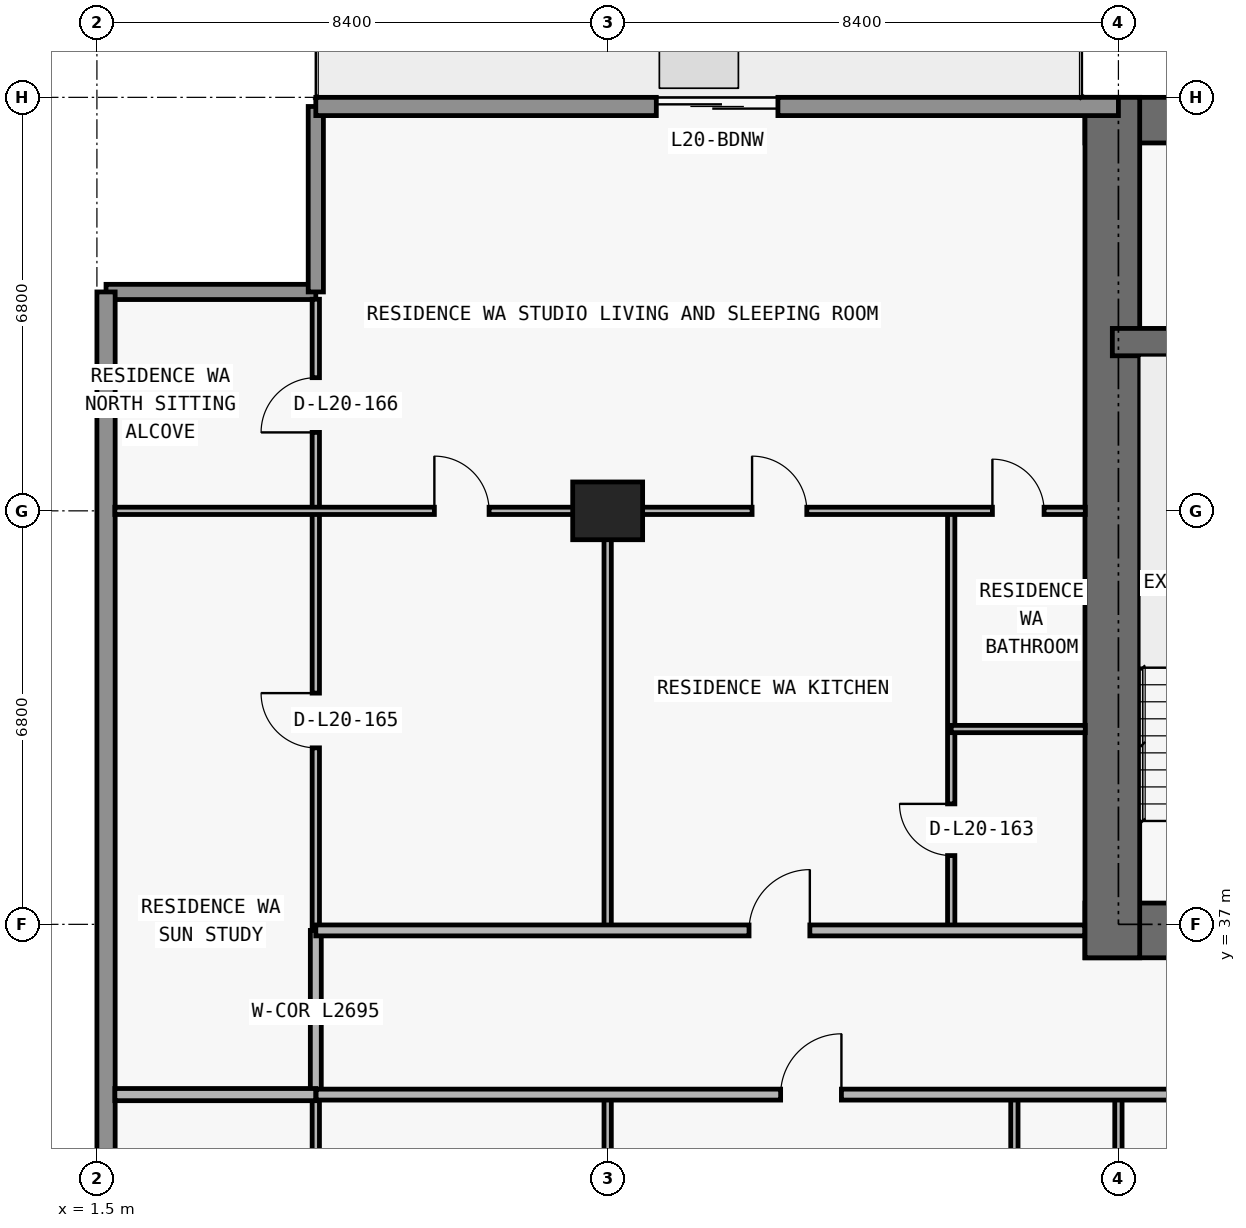
"""IFC4 building model, lengths in metres.
Left out: names, types, materials, properties, quantities, classifications, styles, units other than length and angle.
Written with IfcOpenShell. Run it as: python <this file> out.ifc"""

import sys

from ifc_helpers import new_model, si_unit, direction, frame, frame_2d, origin, origin_2d, place, context, subcontext, project, spatial, rectangle, extrude, element, fill, save


model = new_model("IFC4")
c1 = context("Model", 3, precision=1e-05, world=origin(), true_north=direction((0.0, 1.0)))
c2 = subcontext(c1, "Body", "Model", "MODEL_VIEW")
j1 = project(units=[si_unit("LENGTHUNIT", "METRE"), si_unit("PLANEANGLEUNIT", "RADIAN")], contexts=[c1])
p1 = place(None, origin())
s1 = spatial("IfcSite", under=j1, at=p1, CompositionType="ELEMENT")
p2 = place(p1, origin())
s2 = spatial("IfcBuilding", under=s1, at=p2, CompositionType="ELEMENT")
p3 = place(p2, frame((0.0, 0.0, 76.2)))
s3 = spatial("IfcBuildingStorey", under=s2, at=p3, CompositionType="ELEMENT", Elevation=76.2)
p4 = place(p3, frame((9.9, 43.8, 0.0), z_axis=(0.0, 0.0, 1.0), x_axis=(1.0, 0.0, 0.0)))
e1 = element("IfcColumn", 1, at=p4, inside=s3, PredefinedType="COLUMN", context=c2, shape_type="SweptSolid", body=[
    extrude(rectangle(XDim=1.15, YDim=0.95, at=origin_2d()), origin(), (0.0, 0.0, 1.0), 3.0),
])
p5 = place(p3, frame((17.75, 36.9, 0.0), z_axis=(0.0, 0.0, 1.0), x_axis=(1.0, 0.0, 0.0)))
e2 = element("IfcWall", 2, at=p5, inside=s3, PredefinedType="SHEAR", context=c2, shape_type="SweptSolid", body=[
    extrude(rectangle(XDim=42.3, YDim=0.9, at=frame_2d((21.15, 0.0))), origin(), (0.0, 0.0, 1.0), 3.0),
])
p6 = place(p5, frame((14.55, 0.0, 0.0)))
e3 = element("IfcOpeningElement", 3, at=p6, cuts=e2, PredefinedType="OPENING", context=c2, shape_type="SweptSolid", body=[
    extrude(rectangle(XDim=1.1, YDim=2.15, at=frame_2d((0.55, 1.075))), frame((0.0, 0.46, 0.0), z_axis=(0.0, -1.0, 0.0), x_axis=(1.0, 0.0, 0.0)), (0.0, 0.0, 1.0), 0.92),
])
p7 = place(p5, frame((6.4, 0.0, 0.0)))
e4 = element("IfcOpeningElement", 4, at=p7, cuts=e2, PredefinedType="OPENING", context=c2, shape_type="SweptSolid", body=[
    extrude(rectangle(XDim=1.05, YDim=2.15, at=frame_2d((0.525, 1.075))), frame((0.0, 0.46, 0.0), z_axis=(0.0, -1.0, 0.0), x_axis=(1.0, 0.0, 0.0)), (0.0, 0.0, 1.0), 0.92),
])
p8 = place(p5, frame((34.9, 0.0, 0.0)))
e5 = element("IfcOpeningElement", 5, at=p8, cuts=e2, PredefinedType="OPENING", context=c2, shape_type="SweptSolid", body=[
    extrude(rectangle(XDim=1.05, YDim=2.15, at=frame_2d((0.525, 1.075))), frame((0.0, 0.46, 0.0), z_axis=(0.0, -1.0, 0.0), x_axis=(1.0, 0.0, 0.0)), (0.0, 0.0, 1.0), 0.92),
])
p9 = place(p5, frame((11.012, 0.0, 0.0)))
e6 = element("IfcOpeningElement", 6, at=p9, cuts=e2, PredefinedType="OPENING", context=c2, shape_type="SweptSolid", body=[
    extrude(rectangle(XDim=1.05, YDim=2.15, at=frame_2d((0.525, 1.075))), frame((0.0, 0.46, 0.0), z_axis=(0.0, -1.0, 0.0), x_axis=(1.0, 0.0, 0.0)), (0.0, 0.0, 1.0), 0.92),
])
p10 = place(p5, frame((24.25, 0.0, 0.0)))
e7 = element("IfcOpeningElement", 7, at=p10, cuts=e2, PredefinedType="OPENING", context=c2, shape_type="SweptSolid", body=[
    extrude(rectangle(XDim=1.05, YDim=2.15, at=frame_2d((0.525, 1.075))), frame((0.0, 0.46, 0.0), z_axis=(0.0, -1.0, 0.0), x_axis=(1.0, 0.0, 0.0)), (0.0, 0.0, 1.0), 0.92),
])
p11 = place(p3, frame((17.75, 50.225, 0.0), z_axis=(0.0, 0.0, 1.0), x_axis=(1.0, 0.0, 0.0)))
e8 = element("IfcWall", 8, at=p11, inside=s3, PredefinedType="SHEAR", context=c2, shape_type="SweptSolid", body=[
    extrude(rectangle(XDim=42.3, YDim=0.75, at=frame_2d((21.15, 0.0))), origin(), (0.0, 0.0, 1.0), 3.0),
])
p12 = place(p3, frame((18.2, 36.45, 0.0), z_axis=(0.0, 0.0, 1.0), x_axis=(0.0, 1.0, 0.0)))
e9 = element("IfcWall", 9, at=p12, inside=s3, PredefinedType="SHEAR", context=c2, shape_type="SweptSolid", body=[
    extrude(rectangle(XDim=14.15, YDim=0.9, at=frame_2d((7.075, 0.0))), origin(), (0.0, 0.0, 1.0), 3.0),
])
p13 = place(p3, frame((18.2, 46.575, 0.0), z_axis=(0.0, 0.0, 1.0), x_axis=(1.0, 0.0, 0.0)))
e10 = element("IfcWall", 10, at=p13, inside=s3, PredefinedType="SHEAR", context=c2, shape_type="SweptSolid", body=[
    extrude(rectangle(XDim=41.4, YDim=0.45, at=frame_2d((20.7, 0.0))), origin(), (0.0, 0.0, 1.0), 3.0),
])
p14 = place(p13, frame((7.7, 0.0, 0.0)))
e11 = element("IfcOpeningElement", 11, at=p14, cuts=e10, PredefinedType="OPENING", context=c2, shape_type="SweptSolid", body=[
    extrude(rectangle(XDim=1.0, YDim=2.2, at=frame_2d((0.5, 1.1))), frame((0.0, 0.235, 0.0), z_axis=(0.0, -1.0, 0.0), x_axis=(1.0, 0.0, 0.0)), (0.0, 0.0, 1.0), 0.47),
])
p15 = place(p13, frame((32.725, 0.0, 0.0)))
e12 = element("IfcOpeningElement", 12, at=p15, cuts=e10, PredefinedType="OPENING", context=c2, shape_type="SweptSolid", body=[
    extrude(rectangle(XDim=1.05, YDim=2.15, at=frame_2d((0.525, 1.075))), frame((0.0, 0.235, 0.0), z_axis=(0.0, -1.0, 0.0), x_axis=(1.0, 0.0, 0.0)), (0.0, 0.0, 1.0), 0.47),
])
p16 = place(p3, frame((1.65, 47.4, 0.0), z_axis=(0.0, 0.0, 1.0), x_axis=(1.0, 0.0, 0.0)))
e13 = element("IfcWall", 13, at=p16, inside=s3, PredefinedType="ELEMENTEDWALL", context=c2, shape_type="SweptSolid", body=[
    extrude(rectangle(XDim=3.45, YDim=0.25, at=frame_2d((1.725, 0.0))), origin(), (0.0, 0.0, 1.0), 3.0),
])
p17 = place(p3, frame((5.1, 47.4, 0.0), z_axis=(0.0, 0.0, 1.0), x_axis=(0.0, 1.0, 0.0)))
e14 = element("IfcWall", 14, at=p17, inside=s3, PredefinedType="ELEMENTEDWALL", context=c2, shape_type="SweptSolid", body=[
    extrude(rectangle(XDim=3.05, YDim=0.25, at=frame_2d((1.525, 0.0))), origin(), (0.0, 0.0, 1.0), 3.0),
])
p18 = place(p3, frame((1.65, 26.8, 0.0), z_axis=(0.0, 0.0, 1.0), x_axis=(0.0, 1.0, 0.0)))
e15 = element("IfcWall", 15, at=p18, inside=s3, PredefinedType="STANDARD", context=c2, shape_type="SweptSolid", body=[
    extrude(rectangle(XDim=20.6, YDim=0.3, at=frame_2d((10.3, 0.0))), origin(), (0.0, 0.0, 1.0), 3.0),
])
p19 = place(p3, frame((5.1, 50.45, 0.0), z_axis=(0.0, 0.0, 1.0), x_axis=(1.0, 0.0, 0.0)))
e16 = element("IfcWall", 16, at=p19, inside=s3, PredefinedType="STANDARD", context=c2, shape_type="SweptSolid", body=[
    extrude(rectangle(XDim=13.2, YDim=0.3, at=frame_2d((6.6, 0.0))), origin(), (0.0, 0.0, 1.0), 3.0),
])
p20 = place(p19, frame((5.6, 0.0, 0.0)))
e17 = element("IfcOpeningElement", 17, at=p20, cuts=e16, PredefinedType="OPENING", context=c2, shape_type="SweptSolid", body=[
    extrude(rectangle(XDim=2.0, YDim=2.3, at=frame_2d((1.0, 1.15))), frame((0.0, 0.16, 0.0), z_axis=(0.0, -1.0, 0.0), x_axis=(1.0, 0.0, 0.0)), (0.0, 0.0, 1.0), 0.32),
])
p21 = place(p3, frame((5.1, 6.285, 0.0), z_axis=(0.0, 0.0, 1.0), x_axis=(0.0, 1.0, 0.0)))
e18 = element("IfcWall", 18, at=p21, inside=s3, PredefinedType="PARTITIONING", context=c2, shape_type="SweptSolid", body=[
    extrude(rectangle(XDim=27.915, YDim=0.12, at=frame_2d((13.958, 0.0))), origin(), (0.0, 0.0, 1.0), 3.0),
])
p22 = place(p21, frame((13.508, 0.0, 0.0)))
e19 = element("IfcOpeningElement", 19, at=p22, cuts=e18, PredefinedType="OPENING", context=c2, shape_type="SweptSolid", body=[
    extrude(rectangle(XDim=0.9, YDim=2.15, at=frame_2d((0.45, 1.075))), frame((0.0, 0.07, 0.0), z_axis=(0.0, -1.0, 0.0), x_axis=(1.0, 0.0, 0.0)), (0.0, 0.0, 1.0), 0.14),
])
p23 = place(p3, frame((5.1, 34.205, 0.0), z_axis=(0.0, 0.0, 1.0), x_axis=(0.0, 1.0, 0.0)))
e20 = element("IfcWall", 20, at=p23, inside=s3, PredefinedType="PARTITIONING", context=c2, shape_type="SweptSolid", body=[
    extrude(rectangle(XDim=2.695, YDim=0.18, at=frame_2d((1.347, 0.0))), origin(), (0.0, 0.0, 1.0), 3.0),
])
p24 = place(p3, frame((5.1, 36.905, 0.0), z_axis=(0.0, 0.0, 1.0), x_axis=(0.0, 1.0, 0.0)))
e21 = element("IfcWall", 21, at=p24, inside=s3, PredefinedType="PARTITIONING", context=c2, shape_type="SweptSolid", body=[
    extrude(rectangle(XDim=10.375, YDim=0.12, at=frame_2d((5.188, 0.0))), origin(), (0.0, 0.0, 1.0), 3.0),
])
p25 = place(p24, frame((2.998, 0.0, 0.0)))
e22 = element("IfcOpeningElement", 22, at=p25, cuts=e21, PredefinedType="OPENING", context=c2, shape_type="SweptSolid", body=[
    extrude(rectangle(XDim=0.9, YDim=2.15, at=frame_2d((0.45, 1.075))), frame((0.0, 0.07, 0.0), z_axis=(0.0, -1.0, 0.0), x_axis=(1.0, 0.0, 0.0)), (0.0, 0.0, 1.0), 0.14),
])
p26 = place(p24, frame((8.185, 0.0, 0.0)))
e23 = element("IfcOpeningElement", 23, at=p26, cuts=e21, PredefinedType="OPENING", context=c2, shape_type="SweptSolid", body=[
    extrude(rectangle(XDim=0.9, YDim=2.15, at=frame_2d((0.45, 1.075))), frame((0.0, 0.07, 0.0), z_axis=(0.0, -1.0, 0.0), x_axis=(1.0, 0.0, 0.0)), (0.0, 0.0, 1.0), 0.14),
])
p27 = place(p3, frame((9.9, 6.24, 0.0), z_axis=(0.0, 0.0, 1.0), x_axis=(0.0, 1.0, 0.0)))
e24 = element("IfcWall", 24, at=p27, inside=s3, PredefinedType="PARTITIONING", context=c2, shape_type="SweptSolid", body=[
    extrude(rectangle(XDim=27.96, YDim=0.12, at=frame_2d((13.98, 0.0))), origin(), (0.0, 0.0, 1.0), 2.06),
])
p28 = place(p27, frame((19.09, 0.0, 0.0)))
e25 = element("IfcOpeningElement", 25, at=p28, cuts=e24, PredefinedType="OPENING", context=c2, shape_type="SweptSolid", body=[
    extrude(rectangle(XDim=0.9, YDim=2.01, at=frame_2d((0.45, 1.005))), frame((0.0, 0.07, 0.0), z_axis=(0.0, -1.0, 0.0), x_axis=(1.0, 0.0, 0.0)), (0.0, 0.0, 1.0), 0.14),
])
p29 = place(p3, frame((9.9, 36.9, 0.0), z_axis=(0.0, 0.0, 1.0), x_axis=(0.0, 1.0, 0.0)))
e26 = element("IfcWall", 26, at=p29, inside=s3, PredefinedType="PARTITIONING", context=c2, shape_type="SweptSolid", body=[
    extrude(rectangle(XDim=6.9, YDim=0.12, at=frame_2d((3.45, 0.0))), origin(), (0.0, 0.0, 1.0), 2.06),
])
p30 = place(p3, frame((15.55, 36.9, 0.0), z_axis=(0.0, 0.0, 1.0), x_axis=(0.0, 1.0, 0.0)))
e27 = element("IfcWall", 27, at=p30, inside=s3, PredefinedType="PARTITIONING", context=c2, shape_type="SweptSolid", body=[
    extrude(rectangle(XDim=6.9, YDim=0.12, at=frame_2d((3.45, 0.0))), origin(), (0.0, 0.0, 1.0), 2.449),
])
p31 = place(p30, frame((1.231, 0.0, 0.0)))
e28 = element("IfcOpeningElement", 28, at=p31, cuts=e27, PredefinedType="OPENING", context=c2, shape_type="SweptSolid", body=[
    extrude(rectangle(XDim=0.85, YDim=2.1, at=frame_2d((0.425, 1.05))), frame((0.0, 0.07, 0.0), z_axis=(0.0, -1.0, 0.0), x_axis=(1.0, 0.0, 0.0)), (0.0, 0.0, 1.0), 0.14),
])
p32 = place(p3, frame((16.589, 28.18, 0.0), z_axis=(0.0, 0.0, 1.0), x_axis=(0.0, 1.0, 0.0)))
e29 = element("IfcWall", 29, at=p32, inside=s3, PredefinedType="PARTITIONING", context=c2, shape_type="SweptSolid", body=[
    extrude(rectangle(XDim=6.02, YDim=0.12, at=frame_2d((3.01, 0.0))), origin(), (0.0, 0.0, 1.0), 3.0),
])
p33 = place(p32, frame((2.585, 0.0, 0.0)))
e30 = element("IfcOpeningElement", 30, at=p33, cuts=e29, PredefinedType="OPENING", context=c2, shape_type="SweptSolid", body=[
    extrude(rectangle(XDim=0.85, YDim=2.1, at=frame_2d((0.425, 1.05))), frame((0.0, 0.07, 0.0), z_axis=(0.0, -1.0, 0.0), x_axis=(1.0, 0.0, 0.0)), (0.0, 0.0, 1.0), 0.14),
])
p34 = place(p3, frame((18.3, 6.24, 0.0), z_axis=(0.0, 0.0, 1.0), x_axis=(0.0, 1.0, 0.0)))
e31 = element("IfcWall", 31, at=p34, inside=s3, PredefinedType="PARTITIONING", context=c2, shape_type="SweptSolid", body=[
    extrude(rectangle(XDim=27.96, YDim=0.12, at=frame_2d((13.98, 0.0))), origin(), (0.0, 0.0, 1.0), 2.06),
])
p35 = place(p34, frame((19.09, 0.0, 0.0)))
e32 = element("IfcOpeningElement", 32, at=p35, cuts=e31, PredefinedType="OPENING", context=c2, shape_type="SweptSolid", body=[
    extrude(rectangle(XDim=0.9, YDim=2.01, at=frame_2d((0.45, 1.005))), frame((0.0, 0.07, 0.0), z_axis=(0.0, -1.0, 0.0), x_axis=(1.0, 0.0, 0.0)), (0.0, 0.0, 1.0), 0.14),
])
p36 = place(p3, frame((1.795, 34.2, 0.0), z_axis=(0.0, 0.0, 1.0), x_axis=(1.0, 0.0, 0.0)))
e33 = element("IfcWall", 33, at=p36, inside=s3, PredefinedType="PARTITIONING", context=c2, shape_type="SweptSolid", body=[
    extrude(rectangle(XDim=3.305, YDim=0.2, at=frame_2d((1.653, 0.0))), origin(), (0.0, 0.0, 1.0), 3.0),
])
p37 = place(p3, frame((5.105, 34.2, 0.0), z_axis=(0.0, 0.0, 1.0), x_axis=(1.0, 0.0, 0.0)))
e34 = element("IfcWall", 34, at=p37, inside=s3, PredefinedType="PARTITIONING", context=c2, shape_type="SweptSolid", body=[
    extrude(rectangle(XDim=67.595, YDim=0.18, at=frame_2d((33.797, 0.0))), origin(), (0.0, 0.0, 1.0), 3.0),
])
p38 = place(p37, frame((7.639, 0.0, 0.0)))
e35 = element("IfcOpeningElement", 35, at=p38, cuts=e34, PredefinedType="OPENING", context=c2, shape_type="SweptSolid", body=[
    extrude(rectangle(XDim=1.0, YDim=2.2, at=frame_2d((0.5, 1.1))), frame((0.0, 0.1, 0.0), z_axis=(0.0, -1.0, 0.0), x_axis=(1.0, 0.0, 0.0)), (0.0, 0.0, 1.0), 0.2),
])
p39 = place(p37, frame((24.423, 0.0, 0.0)))
e36 = element("IfcOpeningElement", 36, at=p39, cuts=e34, PredefinedType="OPENING", context=c2, shape_type="SweptSolid", body=[
    extrude(rectangle(XDim=1.0, YDim=2.2, at=frame_2d((0.5, 1.1))), frame((0.0, 0.1, 0.0), z_axis=(0.0, -1.0, 0.0), x_axis=(1.0, 0.0, 0.0)), (0.0, 0.0, 1.0), 0.2),
])
p40 = place(p37, frame((48.825, 0.0, 0.0)))
e37 = element("IfcOpeningElement", 37, at=p40, cuts=e34, PredefinedType="OPENING", context=c2, shape_type="SweptSolid", body=[
    extrude(rectangle(XDim=1.0, YDim=2.2, at=frame_2d((0.5, 1.1))), frame((0.0, 0.1, 0.0), z_axis=(0.0, -1.0, 0.0), x_axis=(1.0, 0.0, 0.0)), (0.0, 0.0, 1.0), 0.2),
])
p41 = place(p3, frame((5.1, 36.9, 0.0), z_axis=(0.0, 0.0, 1.0), x_axis=(1.0, 0.0, 0.0)))
e38 = element("IfcWall", 38, at=p41, inside=s3, PredefinedType="PARTITIONING", context=c2, shape_type="SweptSolid", body=[
    extrude(rectangle(XDim=12.645, YDim=0.18, at=frame_2d((6.323, 0.0))), origin(), (0.0, 0.0, 1.0), 3.0),
])
p42 = place(p41, frame((7.125, 0.0, 0.0)))
e39 = element("IfcOpeningElement", 39, at=p42, cuts=e38, PredefinedType="OPENING", context=c2, shape_type="SweptSolid", body=[
    extrude(rectangle(XDim=1.0, YDim=2.2, at=frame_2d((0.5, 1.1))), frame((0.0, 0.1, 0.0), z_axis=(0.0, -1.0, 0.0), x_axis=(1.0, 0.0, 0.0)), (0.0, 0.0, 1.0), 0.2),
])
p43 = place(p3, frame((15.55, 40.212, 0.0), z_axis=(0.0, 0.0, 1.0), x_axis=(1.0, 0.0, 0.0)))
e40 = element("IfcWall", 40, at=p43, inside=s3, PredefinedType="PARTITIONING", context=c2, shape_type="SweptSolid", body=[
    extrude(rectangle(XDim=2.205, YDim=0.12, at=frame_2d((1.103, 0.0))), origin(), (0.0, 0.0, 1.0), 3.0),
])
p44 = place(p3, frame((1.795, 43.8, 0.0), z_axis=(0.0, 0.0, 1.0), x_axis=(1.0, 0.0, 0.0)))
e41 = element("IfcWall", 41, at=p44, inside=s3, PredefinedType="PARTITIONING", context=c2, shape_type="SweptSolid", body=[
    extrude(rectangle(XDim=15.96, YDim=0.12, at=frame_2d((7.98, 0.0))), origin(), (0.0, 0.0, 1.0), 2.289),
])
p45 = place(p44, frame((5.255, 0.0, 0.0)))
e42 = element("IfcOpeningElement", 42, at=p45, cuts=e41, PredefinedType="OPENING", context=c2, shape_type="SweptSolid", body=[
    extrude(rectangle(XDim=0.9, YDim=2.15, at=frame_2d((0.45, 1.075))), frame((0.0, 0.07, 0.0), z_axis=(0.0, -1.0, 0.0), x_axis=(1.0, 0.0, 0.0)), (0.0, 0.0, 1.0), 0.14),
])
p46 = place(p44, frame((10.48, 0.0, 0.0)))
e43 = element("IfcOpeningElement", 43, at=p46, cuts=e41, PredefinedType="OPENING", context=c2, shape_type="SweptSolid", body=[
    extrude(rectangle(XDim=0.9, YDim=2.15, at=frame_2d((0.45, 1.075))), frame((0.0, 0.07, 0.0), z_axis=(0.0, -1.0, 0.0), x_axis=(1.0, 0.0, 0.0)), (0.0, 0.0, 1.0), 0.14),
])
p47 = place(p44, frame((14.433, 0.0, 0.0)))
e44 = element("IfcOpeningElement", 44, at=p47, cuts=e41, PredefinedType="OPENING", context=c2, shape_type="SweptSolid", body=[
    extrude(rectangle(XDim=0.85, YDim=2.1, at=frame_2d((0.425, 1.05))), frame((0.0, 0.07, 0.0), z_axis=(0.0, -1.0, 0.0), x_axis=(1.0, 0.0, 0.0)), (0.0, 0.0, 1.0), 0.14),
])
p48 = place(p20, origin())
e45 = element("IfcDoor", 45, at=p48, inside=s3, OperationType="DOUBLE_DOOR_SLIDING", PredefinedType="DOOR", context=c2, shape_type="SweptSolid", body=[
    extrude(rectangle(XDim=2.0, YDim=2.3, at=frame_2d((1.0, 1.15))), frame((0.0, 0.025, 0.0), z_axis=(0.0, -1.0, 0.0), x_axis=(1.0, 0.0, 0.0)), (0.0, 0.0, 1.0), 0.05),
])
fill(e17, e45)
p49 = place(p38, origin())
e46 = element("IfcDoor", 46, at=p49, inside=s3, OperationType="SINGLE_SWING_RIGHT", PredefinedType="DOOR", context=c2, shape_type="SweptSolid", body=[
    extrude(rectangle(XDim=1.0, YDim=2.2, at=frame_2d((0.5, 1.1))), frame((0.0, 0.025, 0.0), z_axis=(0.0, -1.0, 0.0), x_axis=(1.0, 0.0, 0.0)), (0.0, 0.0, 1.0), 0.05),
])
fill(e35, e46)
p50 = place(p45, origin())
e47 = element("IfcDoor", 47, at=p50, inside=s3, OperationType="SINGLE_SWING_LEFT", PredefinedType="DOOR", context=c2, shape_type="SweptSolid", body=[
    extrude(rectangle(XDim=0.9, YDim=2.15, at=frame_2d((0.45, 1.075))), frame((0.0, 0.025, 0.0), z_axis=(0.0, -1.0, 0.0), x_axis=(1.0, 0.0, 0.0)), (0.0, 0.0, 1.0), 0.05),
])
fill(e42, e47)
p51 = place(p42, origin())
e48 = element("IfcDoor", 48, at=p51, inside=s3, OperationType="SINGLE_SWING_RIGHT", PredefinedType="DOOR", context=c2, shape_type="SweptSolid", body=[
    extrude(rectangle(XDim=1.0, YDim=2.2, at=frame_2d((0.5, 1.1))), frame((0.0, 0.025, 0.0), z_axis=(0.0, -1.0, 0.0), x_axis=(1.0, 0.0, 0.0)), (0.0, 0.0, 1.0), 0.05),
])
fill(e39, e48)
p52 = place(p46, origin())
e49 = element("IfcDoor", 49, at=p52, inside=s3, OperationType="SINGLE_SWING_LEFT", PredefinedType="DOOR", context=c2, shape_type="SweptSolid", body=[
    extrude(rectangle(XDim=0.9, YDim=2.15, at=frame_2d((0.45, 1.075))), frame((0.0, 0.025, 0.0), z_axis=(0.0, -1.0, 0.0), x_axis=(1.0, 0.0, 0.0)), (0.0, 0.0, 1.0), 0.05),
])
fill(e43, e49)
p53 = place(p31, origin())
e50 = element("IfcDoor", 50, at=p53, inside=s3, OperationType="SINGLE_SWING_RIGHT", PredefinedType="DOOR", context=c2, shape_type="SweptSolid", body=[
    extrude(rectangle(XDim=0.85, YDim=2.1, at=frame_2d((0.425, 1.05))), frame((0.0, 0.025, 0.0), z_axis=(0.0, -1.0, 0.0), x_axis=(1.0, 0.0, 0.0)), (0.0, 0.0, 1.0), 0.05),
])
fill(e28, e50)
p54 = place(p47, origin())
e51 = element("IfcDoor", 51, at=p54, inside=s3, OperationType="SINGLE_SWING_LEFT", PredefinedType="DOOR", context=c2, shape_type="SweptSolid", body=[
    extrude(rectangle(XDim=0.85, YDim=2.1, at=frame_2d((0.425, 1.05))), frame((0.0, 0.025, 0.0), z_axis=(0.0, -1.0, 0.0), x_axis=(1.0, 0.0, 0.0)), (0.0, 0.0, 1.0), 0.05),
])
fill(e44, e51)
p55 = place(p25, origin())
e52 = element("IfcDoor", 52, at=p55, inside=s3, OperationType="SINGLE_SWING_RIGHT", PredefinedType="DOOR", context=c2, shape_type="SweptSolid", body=[
    extrude(rectangle(XDim=0.9, YDim=2.15, at=frame_2d((0.45, 1.075))), frame((0.0, 0.025, 0.0), z_axis=(0.0, -1.0, 0.0), x_axis=(1.0, 0.0, 0.0)), (0.0, 0.0, 1.0), 0.05),
])
fill(e22, e52)
p56 = place(p26, origin())
e53 = element("IfcDoor", 53, at=p56, inside=s3, OperationType="SINGLE_SWING_LEFT", PredefinedType="DOOR", context=c2, shape_type="SweptSolid", body=[
    extrude(rectangle(XDim=0.9, YDim=2.15, at=frame_2d((0.45, 1.075))), frame((0.0, 0.025, 0.0), z_axis=(0.0, -1.0, 0.0), x_axis=(1.0, 0.0, 0.0)), (0.0, 0.0, 1.0), 0.05),
])
fill(e23, e53)
save(model, sys.argv[1])
